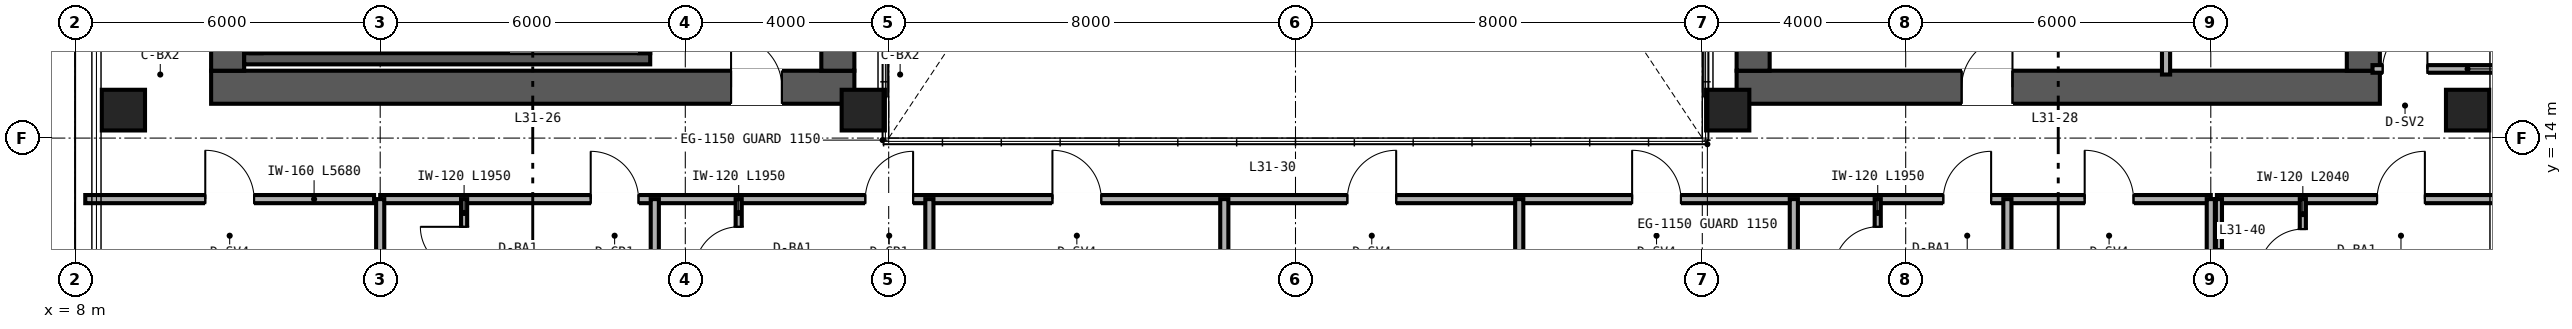
"""IFC4 building model, lengths in metres.
Left out: names, types, materials, properties, quantities, classifications, styles, units other than length and angle.
Written with IfcOpenShell. Run it as: python <this file> out.ifc"""

import sys

from ifc_helpers import new_model, si_unit, direction, frame, frame_2d, origin, origin_2d, place, context, subcontext, project, spatial, rectangle, hollow_rectangle, extrude, source, transform, mapped, element, fill, save


model = new_model("IFC4")
c1 = context("Model", 3, precision=1e-05, world=origin(), true_north=direction((0.0, 1.0)))
c2 = subcontext(c1, "Body", "Model", "MODEL_VIEW")
j1 = project(units=[si_unit("LENGTHUNIT", "METRE"), si_unit("PLANEANGLEUNIT", "RADIAN")], contexts=[c1])
p1 = place(None, origin())
s1 = spatial("IfcSite", under=j1, at=p1, CompositionType="ELEMENT")
p2 = place(p1, origin())
s2 = spatial("IfcBuilding", under=s1, at=p2, CompositionType="ELEMENT")
p3 = place(p2, frame((0.0, 0.0, 126.0)))
s3 = spatial("IfcBuildingStorey", under=s2, at=p3, CompositionType="ELEMENT", Elevation=126.0)
p4 = place(p3, frame((10.675, 15.0, 0.0), z_axis=(0.0, 0.0, 1.0), x_axis=(1.0, 0.0, 0.0)))
e1 = element("IfcWall", 1, at=p4, inside=s3, PredefinedType="SHEAR", context=c2, shape_type="SweptSolid", body=[
    extrude(rectangle(XDim=12.65, YDim=0.65, at=frame_2d((6.325, 0.0))), origin(), (0.0, 0.0, 1.0), 3.36),
])
p5 = place(p4, frame((10.225, 0.0, 0.0)))
e2 = element("IfcOpeningElement", 2, at=p5, cuts=e1, PredefinedType="OPENING", context=c2, shape_type="SweptSolid", body=[
    extrude(rectangle(XDim=1.0, YDim=2.15, at=frame_2d((0.5, 1.075))), frame((0.0, 0.335, 0.0), z_axis=(0.0, -1.0, 0.0), x_axis=(1.0, 0.0, 0.0)), (0.0, 0.0, 1.0), 0.67),
])
for number, where, z_axis, x_axis in (
    (3, (11.0, 15.325, 0.0), (0.0, 0.0, 1.0), (0.0, 1.0, 0.0)),
    (4, (23.0, 15.325, 0.0), (0.0, 0.0, 1.0), (0.0, 1.0, 0.0)),
):
    element("IfcWall", number, at=place(p3, frame(where, z_axis=z_axis, x_axis=x_axis)), inside=s3, PredefinedType="SHEAR", context=c2, shape_type="SweptSolid", body=[
        extrude(rectangle(XDim=21.35, YDim=0.65, at=frame_2d((10.675, 0.0))), origin(), (0.0, 0.0, 1.0), 3.36),
    ])
p6 = place(p3, frame((40.675, 15.0, 0.0), z_axis=(0.0, 0.0, 1.0), x_axis=(1.0, 0.0, 0.0)))
e5 = element("IfcWall", 5, at=p6, inside=s3, PredefinedType="SHEAR", context=c2, shape_type="SweptSolid", body=[
    extrude(rectangle(XDim=12.65, YDim=0.65, at=frame_2d((6.325, 0.0))), origin(), (0.0, 0.0, 1.0), 3.36),
])
p7 = place(p6, frame((4.425, 0.0, 0.0)))
e6 = element("IfcOpeningElement", 6, at=p7, cuts=e5, PredefinedType="OPENING", context=c2, shape_type="SweptSolid", body=[
    extrude(rectangle(XDim=1.0, YDim=2.15, at=frame_2d((0.5, 1.075))), frame((0.0, 0.335, 0.0), z_axis=(0.0, -1.0, 0.0), x_axis=(1.0, 0.0, 0.0)), (0.0, 0.0, 1.0), 0.67),
])
for number, where, z_axis, x_axis in (
    (7, (41.0, 15.325, 0.0), (0.0, 0.0, 1.0), (0.0, 1.0, 0.0)),
    (8, (53.0, 15.325, 0.0), (0.0, 0.0, 1.0), (0.0, 1.0, 0.0)),
):
    element("IfcWall", number, at=place(p3, frame(where, z_axis=z_axis, x_axis=x_axis)), inside=s3, PredefinedType="SHEAR", context=c2, shape_type="SweptSolid", body=[
        extrude(rectangle(XDim=21.35, YDim=0.65, at=frame_2d((10.675, 0.0))), origin(), (0.0, 0.0, 1.0), 3.36),
    ])
p8 = place(p3, frame((11.325, 15.56, 0.0), z_axis=(0.0, 0.0, 1.0), x_axis=(1.0, 0.0, 0.0)))
e9 = element("IfcWall", 9, at=p8, inside=s3, PredefinedType="SHEAR", context=c2, shape_type="SweptSolid", body=[
    extrude(rectangle(XDim=7.985, YDim=0.22, at=frame_2d((3.993, 0.0))), origin(), (0.0, 0.0, 1.0), 3.4),
])
for number, where, z_axis, x_axis in (
    (10, (11.56, 15.67, 0.0), (0.0, 0.0, 1.0), (0.0, 1.0, 0.0)),
    (11, (19.2, 15.67, 0.0), (0.0, 0.0, 1.0), (0.0, 1.0, 0.0)),
):
    element("IfcWall", number, at=place(p3, frame(where, z_axis=z_axis, x_axis=x_axis)), inside=s3, PredefinedType="SHEAR", context=c2, shape_type="SweptSolid", body=[
        extrude(rectangle(XDim=3.28, YDim=0.22, at=frame_2d((1.64, 0.0))), origin(), (0.0, 0.0, 1.0), 3.4),
    ])
m1 = source(origin(), c2, "Body", "SweptSolid", [
    extrude(hollow_rectangle(XDim=0.85, YDim=0.8, WallThickness=0.032, at=origin_2d()), origin(), (0.0, 0.0, 1.0), 3.36),
])
for number, where, z_axis, x_axis in (
    (12, (8.95, 14.55, 0.0), (0.0, 0.0, 1.0), (1.0, 0.0, 0.0)),
    (13, (23.5, 14.55, 0.0), (0.0, 0.0, 1.0), (1.0, 0.0, 0.0)),
    (14, (40.5, 14.55, 0.0), (0.0, 0.0, 1.0), (1.0, 0.0, 0.0)),
    (15, (55.05, 14.55, 0.0), (0.0, 0.0, 1.0), (1.0, 0.0, 0.0)),
):
    element("IfcColumn", number, at=place(p3, frame(where, z_axis=z_axis, x_axis=x_axis)), inside=s3, PredefinedType="COLUMN", context=c2, shape_type="MappedRepresentation", body=[
        mapped(m1, transform((0.0, 0.0, 0.0), scale=1.0)),
    ])
p9 = place(p3, frame((49.12, 15.25, 0.0), z_axis=(0.0, 0.0, 1.0), x_axis=(0.0, 1.0, 0.0)))
e16 = element("IfcWall", 16, at=p9, inside=s3, PredefinedType="PARTITIONING", context=c2, shape_type="SweptSolid", body=[
    extrude(rectangle(XDim=16.13, YDim=0.16, at=frame_2d((8.065, 0.0))), origin(), (0.0, 0.0, 1.0), 2.36),
])
p10 = place(p9, frame((3.8, 0.0, 0.0)))
e17 = element("IfcOpeningElement", 17, at=p10, cuts=e16, PredefinedType="OPENING", context=c2, shape_type="SweptSolid", body=[
    extrude(rectangle(XDim=0.92, YDim=2.15, at=frame_2d((0.46, 1.075))), frame((0.0, 0.09, 0.0), z_axis=(0.0, -1.0, 0.0), x_axis=(1.0, 0.0, 0.0)), (0.0, 0.0, 1.0), 0.18),
])
p11 = place(p9, frame((11.8, 0.0, 0.0)))
e18 = element("IfcOpeningElement", 18, at=p11, cuts=e16, PredefinedType="OPENING", context=c2, shape_type="SweptSolid", body=[
    extrude(rectangle(XDim=0.9, YDim=2.15, at=frame_2d((0.45, 1.075))), frame((0.0, 0.09, 0.0), z_axis=(0.0, -1.0, 0.0), x_axis=(1.0, 0.0, 0.0)), (0.0, 0.0, 1.0), 0.18),
])
p12 = place(p3, frame((53.18, 15.36, 0.0), z_axis=(0.0, 0.0, 1.0), x_axis=(1.0, 0.0, 0.0)))
e19 = element("IfcWall", 19, at=p12, inside=s3, PredefinedType="PARTITIONING", context=c2, shape_type="SweptSolid", body=[
    extrude(rectangle(XDim=2.66, YDim=0.15, at=frame_2d((1.33, 0.0))), origin(), (0.0, 0.0, 1.0), 2.581),
])
p13 = place(p12, frame((0.2, 0.0, 0.0)))
e20 = element("IfcOpeningElement", 20, at=p13, cuts=e19, PredefinedType="OPENING", context=c2, shape_type="SweptSolid", body=[
    extrude(rectangle(XDim=0.88, YDim=2.15, at=frame_2d((0.44, 1.075))), frame((0.0, 0.085, 0.0), z_axis=(0.0, -1.0, 0.0), x_axis=(1.0, 0.0, 0.0)), (0.0, 0.0, 1.0), 0.17),
])
p14 = place(p3, frame((8.2, 12.8, 0.0), z_axis=(0.0, 0.0, 1.0), x_axis=(1.0, 0.0, 0.0)))
e21 = element("IfcWall", 21, at=p14, inside=s3, PredefinedType="PARTITIONING", context=c2, shape_type="SweptSolid", body=[
    extrude(rectangle(XDim=5.68, YDim=0.16, at=frame_2d((2.84, 0.0))), origin(), (0.0, 0.0, 1.0), 3.36),
])
p15 = place(p14, frame((2.36, 0.0, 0.0)))
e22 = element("IfcOpeningElement", 22, at=p15, cuts=e21, PredefinedType="OPENING", context=c2, shape_type="SweptSolid", body=[
    extrude(rectangle(XDim=0.96, YDim=2.15, at=frame_2d((0.48, 1.075))), frame((0.0, 0.09, 0.0), z_axis=(0.0, -1.0, 0.0), x_axis=(1.0, 0.0, 0.0)), (0.0, 0.0, 1.0), 0.18),
])
p16 = place(p3, frame((50.12, 12.8, 0.0), z_axis=(0.0, 0.0, 1.0), x_axis=(1.0, 0.0, 0.0)))
e23 = element("IfcWall", 23, at=p16, inside=s3, PredefinedType="PARTITIONING", context=c2, shape_type="SweptSolid", body=[
    extrude(rectangle(XDim=5.68, YDim=0.16, at=frame_2d((2.84, 0.0))), origin(), (0.0, 0.0, 1.0), 3.36),
])
p17 = place(p16, frame((3.15, 0.0, 0.0)))
e24 = element("IfcOpeningElement", 24, at=p17, cuts=e23, PredefinedType="OPENING", context=c2, shape_type="SweptSolid", body=[
    extrude(rectangle(XDim=0.94, YDim=2.15, at=frame_2d((0.47, 1.075))), frame((0.0, 0.09, 0.0), z_axis=(0.0, -1.0, 0.0), x_axis=(1.0, 0.0, 0.0)), (0.0, 0.0, 1.0), 0.18),
])
p18 = place(p3, frame((51.81, 10.76, 0.0), z_axis=(0.0, 0.0, 1.0), x_axis=(0.0, 1.0, 0.0)))
e25 = element("IfcWall", 25, at=p18, inside=s3, PredefinedType="PARTITIONING", context=c2, shape_type="SweptSolid", body=[
    extrude(rectangle(XDim=2.04, YDim=0.12, at=frame_2d((1.02, 0.0))), origin(), (0.0, 0.0, 1.0), 3.36),
])
p19 = place(p18, frame((0.59, 0.0, 0.0)))
e26 = element("IfcOpeningElement", 26, at=p19, cuts=e25, PredefinedType="OPENING", context=c2, shape_type="SweptSolid", body=[
    extrude(rectangle(XDim=0.86, YDim=2.1, at=frame_2d((0.43, 1.05))), frame((0.0, 0.07, 0.0), z_axis=(0.0, -1.0, 0.0), x_axis=(1.0, 0.0, 0.0)), (0.0, 0.0, 1.0), 0.14),
])
p20 = place(p3, frame((50.16, 10.76, 0.0), z_axis=(0.0, 0.0, 1.0), x_axis=(0.0, 1.0, 0.0)))
e27 = element("IfcWall", 27, at=p20, inside=s3, PredefinedType="PARTITIONING", context=c2, shape_type="SweptSolid", body=[
    extrude(rectangle(XDim=2.04, YDim=0.12, at=frame_2d((1.02, 0.0))), origin(), (0.0, 0.0, 1.0), 3.36),
])
p21 = place(p3, frame((14.0, 12.8, 0.0), z_axis=(0.0, 0.0, 1.0), x_axis=(1.0, 0.0, 0.0)))
e28 = element("IfcWall", 28, at=p21, inside=s3, PredefinedType="PARTITIONING", context=c2, shape_type="SweptSolid", body=[
    extrude(rectangle(XDim=36.0, YDim=0.16, at=frame_2d((18.0, 0.0))), origin(), (0.0, 0.0, 1.0), 2.581),
])
p22 = place(p21, frame((4.14, 0.0, 0.0)))
e29 = element("IfcOpeningElement", 29, at=p22, cuts=e28, PredefinedType="OPENING", context=c2, shape_type="SweptSolid", body=[
    extrude(rectangle(XDim=0.94, YDim=2.15, at=frame_2d((0.47, 1.075))), frame((0.0, 0.09, 0.0), z_axis=(0.0, -1.0, 0.0), x_axis=(1.0, 0.0, 0.0)), (0.0, 0.0, 1.0), 0.18),
])
p23 = place(p21, frame((9.54, 0.0, 0.0)))
e30 = element("IfcOpeningElement", 30, at=p23, cuts=e28, PredefinedType="OPENING", context=c2, shape_type="SweptSolid", body=[
    extrude(rectangle(XDim=0.94, YDim=2.15, at=frame_2d((0.47, 1.075))), frame((0.0, 0.09, 0.0), z_axis=(0.0, -1.0, 0.0), x_axis=(1.0, 0.0, 0.0)), (0.0, 0.0, 1.0), 0.18),
])
p24 = place(p21, frame((13.22, 0.0, 0.0)))
e31 = element("IfcOpeningElement", 31, at=p24, cuts=e28, PredefinedType="OPENING", context=c2, shape_type="SweptSolid", body=[
    extrude(rectangle(XDim=0.96, YDim=2.15, at=frame_2d((0.48, 1.075))), frame((0.0, 0.09, 0.0), z_axis=(0.0, -1.0, 0.0), x_axis=(1.0, 0.0, 0.0)), (0.0, 0.0, 1.0), 0.18),
])
p25 = place(p21, frame((19.02, 0.0, 0.0)))
e32 = element("IfcOpeningElement", 32, at=p25, cuts=e28, PredefinedType="OPENING", context=c2, shape_type="SweptSolid", body=[
    extrude(rectangle(XDim=0.96, YDim=2.15, at=frame_2d((0.48, 1.075))), frame((0.0, 0.09, 0.0), z_axis=(0.0, -1.0, 0.0), x_axis=(1.0, 0.0, 0.0)), (0.0, 0.0, 1.0), 0.18),
])
p26 = place(p21, frame((24.62, 0.0, 0.0)))
e33 = element("IfcOpeningElement", 33, at=p26, cuts=e28, PredefinedType="OPENING", context=c2, shape_type="SweptSolid", body=[
    extrude(rectangle(XDim=0.96, YDim=2.15, at=frame_2d((0.48, 1.075))), frame((0.0, 0.09, 0.0), z_axis=(0.0, -1.0, 0.0), x_axis=(1.0, 0.0, 0.0)), (0.0, 0.0, 1.0), 0.18),
])
p27 = place(p21, frame((30.74, 0.0, 0.0)))
e34 = element("IfcOpeningElement", 34, at=p27, cuts=e28, PredefinedType="OPENING", context=c2, shape_type="SweptSolid", body=[
    extrude(rectangle(XDim=0.94, YDim=2.15, at=frame_2d((0.47, 1.075))), frame((0.0, 0.09, 0.0), z_axis=(0.0, -1.0, 0.0), x_axis=(1.0, 0.0, 0.0)), (0.0, 0.0, 1.0), 0.18),
])
p28 = place(p21, frame((33.52, 0.0, 0.0)))
e35 = element("IfcOpeningElement", 35, at=p28, cuts=e28, PredefinedType="OPENING", context=c2, shape_type="SweptSolid", body=[
    extrude(rectangle(XDim=0.96, YDim=2.15, at=frame_2d((0.48, 1.075))), frame((0.0, 0.09, 0.0), z_axis=(0.0, -1.0, 0.0), x_axis=(1.0, 0.0, 0.0)), (0.0, 0.0, 1.0), 0.18),
])
for number, where, z_axis, x_axis in (
    (36, (14.0, 2.36, 0.0), (0.0, 0.0, 1.0), (0.0, 1.0, 0.0)),
    (37, (50.0, 2.36, 0.0), (0.0, 0.0, 1.0), (0.0, 1.0, 0.0)),
    (38, (19.4, 2.36, 0.0), (0.0, 0.0, 1.0), (0.0, 1.0, 0.0)),
):
    element("IfcWall", number, at=place(p3, frame(where, z_axis=z_axis, x_axis=x_axis)), inside=s3, PredefinedType="PARTITIONING", context=c2, shape_type="SweptSolid", body=[
        extrude(rectangle(XDim=10.44, YDim=0.16, at=frame_2d((5.22, 0.0))), origin(), (0.0, 0.0, 1.0), 2.667),
    ])
p29 = place(p3, frame((15.65, 10.85, 0.0), z_axis=(0.0, 0.0, 1.0), x_axis=(0.0, 1.0, 0.0)))
e39 = element("IfcWall", 39, at=p29, inside=s3, PredefinedType="PARTITIONING", context=c2, shape_type="SweptSolid", body=[
    extrude(rectangle(XDim=1.95, YDim=0.12, at=frame_2d((0.975, 0.0))), origin(), (0.0, 0.0, 1.0), 3.36),
])
p30 = place(p29, frame((0.545, 0.0, 0.0)))
e40 = element("IfcOpeningElement", 40, at=p30, cuts=e39, PredefinedType="OPENING", context=c2, shape_type="SweptSolid", body=[
    extrude(rectangle(XDim=0.86, YDim=2.1, at=frame_2d((0.43, 1.05))), frame((0.0, 0.07, 0.0), z_axis=(0.0, -1.0, 0.0), x_axis=(1.0, 0.0, 0.0)), (0.0, 0.0, 1.0), 0.14),
])
p31 = place(p3, frame((24.8, 2.36, 0.0), z_axis=(0.0, 0.0, 1.0), x_axis=(0.0, 1.0, 0.0)))
e41 = element("IfcWall", 41, at=p31, inside=s3, PredefinedType="PARTITIONING", context=c2, shape_type="SweptSolid", body=[
    extrude(rectangle(XDim=10.44, YDim=0.16, at=frame_2d((5.22, 0.0))), origin(), (0.0, 0.0, 1.0), 2.433),
])
p32 = place(p3, frame((21.05, 10.85, 0.0), z_axis=(0.0, 0.0, 1.0), x_axis=(0.0, 1.0, 0.0)))
e42 = element("IfcWall", 42, at=p32, inside=s3, PredefinedType="PARTITIONING", context=c2, shape_type="SweptSolid", body=[
    extrude(rectangle(XDim=1.95, YDim=0.12, at=frame_2d((0.975, 0.0))), origin(), (0.0, 0.0, 1.0), 3.36),
])
p33 = place(p32, frame((0.545, 0.0, 0.0)))
e43 = element("IfcOpeningElement", 43, at=p33, cuts=e42, PredefinedType="OPENING", context=c2, shape_type="SweptSolid", body=[
    extrude(rectangle(XDim=0.86, YDim=2.1, at=frame_2d((0.43, 1.05))), frame((0.0, 0.07, 0.0), z_axis=(0.0, -1.0, 0.0), x_axis=(1.0, 0.0, 0.0)), (0.0, 0.0, 1.0), 0.14),
])
for number, where, z_axis, x_axis in (
    (44, (30.6, 2.36, 0.0), (0.0, 0.0, 1.0), (0.0, 1.0, 0.0)),
    (45, (36.4, 2.36, 0.0), (0.0, 0.0, 1.0), (0.0, 1.0, 0.0)),
):
    element("IfcWall", number, at=place(p3, frame(where, z_axis=z_axis, x_axis=x_axis)), inside=s3, PredefinedType="PARTITIONING", context=c2, shape_type="SweptSolid", body=[
        extrude(rectangle(XDim=10.44, YDim=0.16, at=frame_2d((5.22, 0.0))), origin(), (0.0, 0.0, 1.0), 2.433),
    ])
p34 = place(p3, frame((41.8, 2.36, 0.0), z_axis=(0.0, 0.0, 1.0), x_axis=(0.0, 1.0, 0.0)))
e46 = element("IfcWall", 46, at=p34, inside=s3, PredefinedType="PARTITIONING", context=c2, shape_type="SweptSolid", body=[
    extrude(rectangle(XDim=10.44, YDim=0.16, at=frame_2d((5.22, 0.0))), origin(), (0.0, 0.0, 1.0), 2.823),
])
p35 = place(p3, frame((46.0, 2.36, 0.0), z_axis=(0.0, 0.0, 1.0), x_axis=(0.0, 1.0, 0.0)))
e47 = element("IfcWall", 47, at=p35, inside=s3, PredefinedType="PARTITIONING", context=c2, shape_type="SweptSolid", body=[
    extrude(rectangle(XDim=10.44, YDim=0.16, at=frame_2d((5.22, 0.0))), origin(), (0.0, 0.0, 1.0), 2.667),
])
p36 = place(p3, frame((43.45, 10.85, 0.0), z_axis=(0.0, 0.0, 1.0), x_axis=(0.0, 1.0, 0.0)))
e48 = element("IfcWall", 48, at=p36, inside=s3, PredefinedType="PARTITIONING", context=c2, shape_type="SweptSolid", body=[
    extrude(rectangle(XDim=1.95, YDim=0.12, at=frame_2d((0.975, 0.0))), origin(), (0.0, 0.0, 1.0), 3.36),
])
p37 = place(p36, frame((0.545, 0.0, 0.0)))
e49 = element("IfcOpeningElement", 49, at=p37, cuts=e48, PredefinedType="OPENING", context=c2, shape_type="SweptSolid", body=[
    extrude(rectangle(XDim=0.86, YDim=2.1, at=frame_2d((0.43, 1.05))), frame((0.0, 0.07, 0.0), z_axis=(0.0, -1.0, 0.0), x_axis=(1.0, 0.0, 0.0)), (0.0, 0.0, 1.0), 0.14),
])
m2 = source(origin(), c2, "Body", "SweptSolid", [
    extrude(rectangle(XDim=1.0, YDim=2.15, at=frame_2d((0.5, 1.075))), frame((0.0, 0.025, 0.0), z_axis=(0.0, -1.0, 0.0), x_axis=(1.0, 0.0, 0.0)), (0.0, 0.0, 1.0), 0.05),
])
p38 = place(p5, origin())
e50 = element("IfcDoor", 50, at=p38, inside=s3, OperationType="SINGLE_SWING_LEFT", PredefinedType="DOOR", context=c2, shape_type="MappedRepresentation", body=[
    mapped(m2, transform((0.0, 0.0, 0.0), scale=1.0)),
])
fill(e2, e50)
p39 = place(p7, origin())
e51 = element("IfcDoor", 51, at=p39, inside=s3, OperationType="SINGLE_SWING_RIGHT", PredefinedType="DOOR", context=c2, shape_type="MappedRepresentation", body=[
    mapped(m2, transform((0.0, 0.0, 0.0), scale=1.0)),
])
fill(e6, e51)
m3 = source(origin(), c2, "Body", "SweptSolid", [
    extrude(rectangle(XDim=0.88, YDim=2.15, at=frame_2d((0.44, 1.075))), frame((0.0, 0.025, 0.0), z_axis=(0.0, -1.0, 0.0), x_axis=(1.0, 0.0, 0.0)), (0.0, 0.0, 1.0), 0.05),
])
p40 = place(p13, origin())
e52 = element("IfcDoor", 52, at=p40, inside=s3, OperationType="SINGLE_SWING_RIGHT", PredefinedType="DOOR", context=c2, shape_type="MappedRepresentation", body=[
    mapped(m3, transform((0.0, 0.0, 0.0), scale=1.0)),
])
fill(e20, e52)
m4 = source(origin(), c2, "Body", "SweptSolid", [
    extrude(rectangle(XDim=0.96, YDim=2.15, at=frame_2d((0.48, 1.075))), frame((0.0, 0.025, 0.0), z_axis=(0.0, -1.0, 0.0), x_axis=(1.0, 0.0, 0.0)), (0.0, 0.0, 1.0), 0.05),
])
p41 = place(p15, origin())
e53 = element("IfcDoor", 53, at=p41, inside=s3, OperationType="SINGLE_SWING_LEFT", PredefinedType="DOOR", context=c2, shape_type="MappedRepresentation", body=[
    mapped(m4, transform((0.0, 0.0, 0.0), scale=1.0)),
])
fill(e22, e53)
m5 = source(origin(), c2, "Body", "SweptSolid", [
    extrude(rectangle(XDim=0.86, YDim=2.1, at=frame_2d((0.43, 1.05))), frame((0.0, 0.025, 0.0), z_axis=(0.0, -1.0, 0.0), x_axis=(1.0, 0.0, 0.0)), (0.0, 0.0, 1.0), 0.05),
])
p42 = place(p19, origin())
e54 = element("IfcDoor", 54, at=p42, inside=s3, OperationType="SINGLE_SWING_LEFT", PredefinedType="DOOR", context=c2, shape_type="MappedRepresentation", body=[
    mapped(m5, transform((0.0, 0.0, 0.0), scale=1.0)),
])
fill(e26, e54)
m6 = source(origin(), c2, "Body", "SweptSolid", [
    extrude(rectangle(XDim=0.94, YDim=2.15, at=frame_2d((0.47, 1.075))), frame((0.0, 0.025, 0.0), z_axis=(0.0, -1.0, 0.0), x_axis=(1.0, 0.0, 0.0)), (0.0, 0.0, 1.0), 0.05),
])
p43 = place(p17, origin())
e55 = element("IfcDoor", 55, at=p43, inside=s3, OperationType="SINGLE_SWING_RIGHT", PredefinedType="DOOR", context=c2, shape_type="MappedRepresentation", body=[
    mapped(m6, transform((0.0, 0.0, 0.0), scale=1.0)),
])
fill(e24, e55)
p44 = place(p30, origin())
e56 = element("IfcDoor", 56, at=p44, inside=s3, OperationType="SINGLE_SWING_RIGHT", PredefinedType="DOOR", context=c2, shape_type="MappedRepresentation", body=[
    mapped(m5, transform((0.0, 0.0, 0.0), scale=1.0)),
])
fill(e40, e56)
p45 = place(p33, origin())
e57 = element("IfcDoor", 57, at=p45, inside=s3, OperationType="SINGLE_SWING_LEFT", PredefinedType="DOOR", context=c2, shape_type="MappedRepresentation", body=[
    mapped(m5, transform((0.0, 0.0, 0.0), scale=1.0)),
])
fill(e43, e57)
p46 = place(p37, origin())
e58 = element("IfcDoor", 58, at=p46, inside=s3, OperationType="SINGLE_SWING_LEFT", PredefinedType="DOOR", context=c2, shape_type="MappedRepresentation", body=[
    mapped(m5, transform((0.0, 0.0, 0.0), scale=1.0)),
])
fill(e49, e58)
p47 = place(p22, origin())
e59 = element("IfcDoor", 59, at=p47, inside=s3, OperationType="SINGLE_SWING_LEFT", PredefinedType="DOOR", context=c2, shape_type="MappedRepresentation", body=[
    mapped(m6, transform((0.0, 0.0, 0.0), scale=1.0)),
])
fill(e29, e59)
p48 = place(p23, origin())
e60 = element("IfcDoor", 60, at=p48, inside=s3, OperationType="SINGLE_SWING_RIGHT", PredefinedType="DOOR", context=c2, shape_type="MappedRepresentation", body=[
    mapped(m6, transform((0.0, 0.0, 0.0), scale=1.0)),
])
fill(e30, e60)
p49 = place(p24, origin())
e61 = element("IfcDoor", 61, at=p49, inside=s3, OperationType="SINGLE_SWING_LEFT", PredefinedType="DOOR", context=c2, shape_type="MappedRepresentation", body=[
    mapped(m4, transform((0.0, 0.0, 0.0), scale=1.0)),
])
fill(e31, e61)
p50 = place(p25, origin())
e62 = element("IfcDoor", 62, at=p50, inside=s3, OperationType="SINGLE_SWING_RIGHT", PredefinedType="DOOR", context=c2, shape_type="MappedRepresentation", body=[
    mapped(m4, transform((0.0, 0.0, 0.0), scale=1.0)),
])
fill(e32, e62)
p51 = place(p26, origin())
e63 = element("IfcDoor", 63, at=p51, inside=s3, OperationType="SINGLE_SWING_LEFT", PredefinedType="DOOR", context=c2, shape_type="MappedRepresentation", body=[
    mapped(m4, transform((0.0, 0.0, 0.0), scale=1.0)),
])
fill(e33, e63)
p52 = place(p27, origin())
e64 = element("IfcDoor", 64, at=p52, inside=s3, OperationType="SINGLE_SWING_RIGHT", PredefinedType="DOOR", context=c2, shape_type="MappedRepresentation", body=[
    mapped(m6, transform((0.0, 0.0, 0.0), scale=1.0)),
])
fill(e34, e64)
p53 = place(p28, origin())
e65 = element("IfcDoor", 65, at=p53, inside=s3, OperationType="SINGLE_SWING_LEFT", PredefinedType="DOOR", context=c2, shape_type="MappedRepresentation", body=[
    mapped(m4, transform((0.0, 0.0, 0.0), scale=1.0)),
])
fill(e35, e65)
save(model, sys.argv[1])
